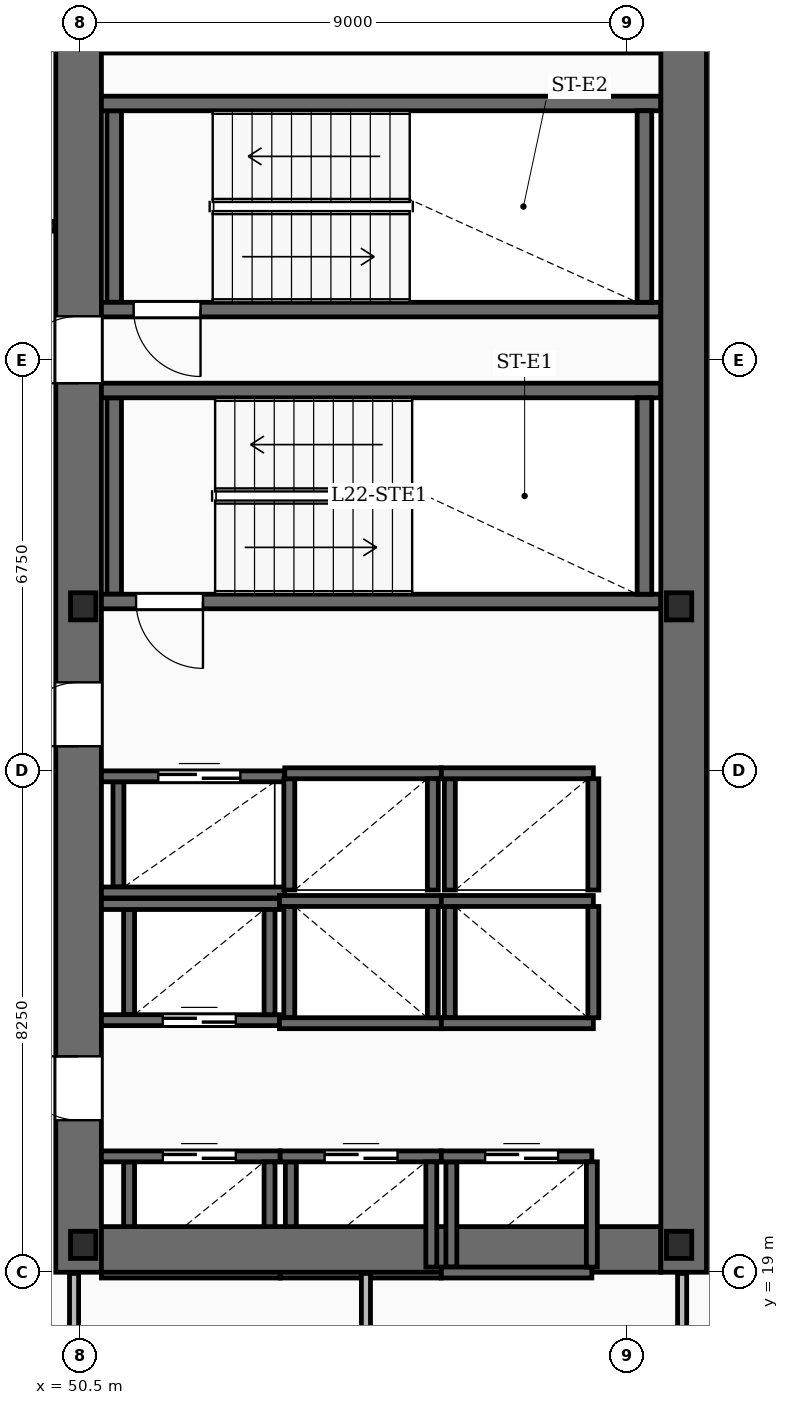
"""IFC4 building model, lengths in metres.
Left out: names, types, materials, properties, quantities, classifications, styles, units other than length and angle.
Written with IfcOpenShell. Run it as: python <this file> out.ifc"""

import sys

from ifc_helpers import new_model, si_unit, direction, frame, frame_2d, origin, origin_2d, place, context, subcontext, project, spatial, rectangle, i_section, extrude, element, fill, save


model = new_model("IFC4")
c1 = context("Model", 3, precision=1e-05, world=origin(), true_north=direction((0.0, 1.0)))
c2 = subcontext(c1, "Body", "Model", "MODEL_VIEW")
j1 = project(units=[si_unit("LENGTHUNIT", "METRE"), si_unit("PLANEANGLEUNIT", "RADIAN")], contexts=[c1])
p1 = place(None, origin())
s1 = spatial("IfcSite", under=j1, at=p1, CompositionType="ELEMENT")
p2 = place(p1, origin())
s2 = spatial("IfcBuilding", under=s1, at=p2, CompositionType="ELEMENT")
p3 = place(p2, frame((0.0, 0.0, 99.7)))
s3 = spatial("IfcBuildingStorey", under=s2, at=p3, CompositionType="ELEMENT", Elevation=99.7)
p4 = place(p3, frame((50.475, 19.0, -0.45), z_axis=(0.0, 0.0, 1.0), x_axis=(0.0, 1.0, 0.0)))
e1 = element("IfcWall", 1, at=p4, inside=s3, PredefinedType="SHEAR", context=c2, shape_type="SweptSolid", body=[
    extrude(rectangle(XDim=20.8, YDim=0.75, at=frame_2d((10.4, 0.0))), origin(), (0.0, 0.0, 1.0), 3.93),
])
p5 = place(p4, frame((2.5, 0.0, 0.45)))
e2 = element("IfcOpeningElement", 2, at=p5, cuts=e1, PredefinedType="OPENING", context=c2, shape_type="SweptSolid", body=[
    extrude(rectangle(XDim=1.05, YDim=2.15, at=frame_2d((0.525, 1.075))), frame((0.0, 0.385, 0.0), z_axis=(0.0, -1.0, 0.0), x_axis=(1.0, 0.0, 0.0)), (0.0, 0.0, 1.0), 0.77),
])
p6 = place(p4, frame((8.65, 0.0, 0.45)))
e3 = element("IfcOpeningElement", 3, at=p6, cuts=e1, PredefinedType="OPENING", context=c2, shape_type="SweptSolid", body=[
    extrude(rectangle(XDim=1.05, YDim=2.15, at=frame_2d((0.525, 1.075))), frame((0.0, 0.385, 0.0), z_axis=(0.0, -1.0, 0.0), x_axis=(1.0, 0.0, 0.0)), (0.0, 0.0, 1.0), 0.77),
])
p7 = place(p4, frame((14.62, 0.0, 0.45)))
e4 = element("IfcOpeningElement", 4, at=p7, cuts=e1, PredefinedType="OPENING", context=c2, shape_type="SweptSolid", body=[
    extrude(rectangle(XDim=1.1, YDim=2.15, at=frame_2d((0.55, 1.075))), frame((0.0, 0.385, 0.0), z_axis=(0.0, -1.0, 0.0), x_axis=(1.0, 0.0, 0.0)), (0.0, 0.0, 1.0), 0.77),
])
p8 = place(p3, frame((60.425, 19.0, -0.45), z_axis=(0.0, 0.0, 1.0), x_axis=(0.0, 1.0, 0.0)))
e5 = element("IfcWall", 5, at=p8, inside=s3, PredefinedType="SHEAR", context=c2, shape_type="SweptSolid", body=[
    extrude(rectangle(XDim=20.8, YDim=0.75, at=frame_2d((10.4, 0.0))), origin(), (0.0, 0.0, 1.0), 3.93),
])
for number, where, z_axis, x_axis in (
    (6, (50.85, 19.375, -0.45), (0.0, 0.0, 1.0), (1.0, 0.0, 0.0)),
    (7, (50.85, 39.425, -0.45), (0.0, 0.0, 1.0), (1.0, 0.0, 0.0)),
):
    element("IfcWall", number, at=place(p3, frame(where, z_axis=z_axis, x_axis=x_axis)), inside=s3, PredefinedType="SHEAR", context=c2, shape_type="SweptSolid", body=[
        extrude(rectangle(XDim=9.2, YDim=0.75, at=frame_2d((4.6, 0.0))), origin(), (0.0, 0.0, 1.0), 3.93),
    ])
for number, where, z_axis, x_axis in (
    (8, (50.55, 19.45, -0.45), (0.0, 0.0, 1.0), (1.0, 0.0, 0.0)),
    (9, (60.35, 19.45, -0.45), (0.0, 0.0, 1.0), (1.0, 0.0, 0.0)),
    (10, (50.55, 29.95, -0.45), (0.0, 0.0, 1.0), (1.0, 0.0, 0.0)),
    (11, (60.35, 29.95, -0.45), (0.0, 0.0, 1.0), (1.0, 0.0, 0.0)),
):
    element("IfcColumn", number, at=place(p3, frame(where, z_axis=z_axis, x_axis=x_axis)), inside=s3, PredefinedType="COLUMN", context=c2, shape_type="SweptSolid", body=[
        extrude(i_section(OverallWidth=0.416, OverallDepth=0.446, WebThickness=0.039, FlangeThickness=0.063, FilletRadius=0.02, at=origin_2d()), origin(), (0.0, 0.0, 1.0), 3.93),
    ])
p9 = place(p3, frame((60.05, 30.03, 0.0), z_axis=(0.0, 0.0, 1.0), x_axis=(-1.0, 0.0, 0.0)))
e12 = element("IfcWall", 12, at=p9, inside=s3, PredefinedType="SOLIDWALL", context=c2, shape_type="SweptSolid", body=[
    extrude(rectangle(XDim=9.2, YDim=0.24, at=frame_2d((4.6, 0.0))), origin(), (0.0, 0.0, 1.0), 3.48),
])
p10 = place(p9, frame((7.53, 0.0, 0.0)))
e13 = element("IfcOpeningElement", 13, at=p10, cuts=e12, PredefinedType="OPENING", context=c2, shape_type="SweptSolid", body=[
    extrude(rectangle(XDim=1.1, YDim=2.15, at=frame_2d((0.55, 1.075))), frame((0.0, 0.13, 0.0), z_axis=(0.0, -1.0, 0.0), x_axis=(1.0, 0.0, 0.0)), (0.0, 0.0, 1.0), 0.26),
])
p11 = place(p3, frame((50.85, 33.5, 0.0), z_axis=(0.0, 0.0, 1.0), x_axis=(1.0, 0.0, 0.0)))
e14 = element("IfcWall", 14, at=p11, inside=s3, PredefinedType="SOLIDWALL", context=c2, shape_type="SweptSolid", body=[
    extrude(rectangle(XDim=9.2, YDim=0.24, at=frame_2d((4.6, 0.0))), origin(), (0.0, 0.0, 1.0), 3.48),
])
for number, where, z_axis, x_axis in (
    (15, (51.06, 30.15, 0.0), (0.0, 0.0, 1.0), (0.0, 1.0, 0.0)),
    (16, (59.78, 30.15, 0.0), (0.0, 0.0, 1.0), (0.0, 1.0, 0.0)),
):
    element("IfcWall", number, at=place(p3, frame(where, z_axis=z_axis, x_axis=x_axis)), inside=s3, PredefinedType="SOLIDWALL", context=c2, shape_type="SweptSolid", body=[
        extrude(rectangle(XDim=3.23, YDim=0.24, at=frame_2d((1.615, 0.0))), origin(), (0.0, 0.0, 1.0), 3.48),
    ])
p12 = place(p3, frame((60.05, 34.83, 0.0), z_axis=(0.0, 0.0, 1.0), x_axis=(-1.0, 0.0, 0.0)))
e17 = element("IfcWall", 17, at=p12, inside=s3, PredefinedType="SOLIDWALL", context=c2, shape_type="SweptSolid", body=[
    extrude(rectangle(XDim=9.2, YDim=0.24, at=frame_2d((4.6, 0.0))), origin(), (0.0, 0.0, 1.0), 3.48),
])
p13 = place(p12, frame((7.57, 0.0, 0.0)))
e18 = element("IfcOpeningElement", 18, at=p13, cuts=e17, PredefinedType="OPENING", context=c2, shape_type="SweptSolid", body=[
    extrude(rectangle(XDim=1.1, YDim=2.15, at=frame_2d((0.55, 1.075))), frame((0.0, 0.13, 0.0), z_axis=(0.0, -1.0, 0.0), x_axis=(1.0, 0.0, 0.0)), (0.0, 0.0, 1.0), 0.26),
])
p14 = place(p3, frame((50.85, 38.22, 0.0), z_axis=(0.0, 0.0, 1.0), x_axis=(1.0, 0.0, 0.0)))
e19 = element("IfcWall", 19, at=p14, inside=s3, PredefinedType="SOLIDWALL", context=c2, shape_type="SweptSolid", body=[
    extrude(rectangle(XDim=9.2, YDim=0.24, at=frame_2d((4.6, 0.0))), origin(), (0.0, 0.0, 1.0), 3.48),
])
for number, where, z_axis, x_axis in (
    (20, (51.06, 34.95, 0.0), (0.0, 0.0, 1.0), (0.0, 1.0, 0.0)),
    (21, (59.78, 34.95, 0.0), (0.0, 0.0, 1.0), (0.0, 1.0, 0.0)),
):
    element("IfcWall", number, at=place(p3, frame(where, z_axis=z_axis, x_axis=x_axis)), inside=s3, PredefinedType="SOLIDWALL", context=c2, shape_type="SweptSolid", body=[
        extrude(rectangle(XDim=3.15, YDim=0.24, at=frame_2d((1.575, 0.0))), origin(), (0.0, 0.0, 1.0), 3.48),
    ])
p15 = place(p3, frame((50.85, 20.905, 0.0), z_axis=(0.0, 0.0, 1.0), x_axis=(1.0, 0.0, 0.0)))
e22 = element("IfcWall", 22, at=p15, inside=s3, PredefinedType="SOLIDWALL", context=c2, shape_type="SweptSolid", body=[
    extrude(rectangle(XDim=2.94, YDim=0.18, at=frame_2d((1.47, 0.0))), origin(), (0.0, 0.0, 1.0), 3.48),
])
p16 = place(p15, frame((1.01, 0.0, 0.0)))
e23 = element("IfcOpeningElement", 23, at=p16, cuts=e22, PredefinedType="OPENING", context=c2, shape_type="SweptSolid", body=[
    extrude(rectangle(XDim=1.2, YDim=2.2, at=frame_2d((0.6, 1.1))), frame((0.0, 0.1, 0.0), z_axis=(0.0, -1.0, 0.0), x_axis=(1.0, 0.0, 0.0)), (0.0, 0.0, 1.0), 0.2),
])
p17 = place(p3, frame((50.85, 18.995, 0.0), z_axis=(0.0, 0.0, 1.0), x_axis=(1.0, 0.0, 0.0)))
e24 = element("IfcWall", 24, at=p17, inside=s3, PredefinedType="SOLIDWALL", context=c2, shape_type="SweptSolid", body=[
    extrude(rectangle(XDim=2.94, YDim=0.18, at=frame_2d((1.47, 0.0))), origin(), (0.0, 0.0, 1.0), 3.48),
])
for number, where, z_axis, x_axis in (
    (25, (51.305, 19.085, 0.0), (0.0, 0.0, 1.0), (0.0, 1.0, 0.0)),
    (26, (53.615, 19.085, 0.0), (0.0, 0.0, 1.0), (0.0, 1.0, 0.0)),
):
    element("IfcWall", number, at=place(p3, frame(where, z_axis=z_axis, x_axis=x_axis)), inside=s3, PredefinedType="SOLIDWALL", context=c2, shape_type="SweptSolid", body=[
        extrude(rectangle(XDim=1.73, YDim=0.18, at=frame_2d((0.865, 0.0))), origin(), (0.0, 0.0, 1.0), 3.48),
    ])
p18 = place(p3, frame((53.79, 20.905, 0.0), z_axis=(0.0, 0.0, 1.0), x_axis=(1.0, 0.0, 0.0)))
e27 = element("IfcWall", 27, at=p18, inside=s3, PredefinedType="SOLIDWALL", context=c2, shape_type="SweptSolid", body=[
    extrude(rectangle(XDim=2.65, YDim=0.18, at=frame_2d((1.325, 0.0))), origin(), (0.0, 0.0, 1.0), 3.48),
])
p19 = place(p18, frame((0.73, 0.0, 0.0)))
e28 = element("IfcOpeningElement", 28, at=p19, cuts=e27, PredefinedType="OPENING", context=c2, shape_type="SweptSolid", body=[
    extrude(rectangle(XDim=1.2, YDim=2.2, at=frame_2d((0.6, 1.1))), frame((0.0, 0.1, 0.0), z_axis=(0.0, -1.0, 0.0), x_axis=(1.0, 0.0, 0.0)), (0.0, 0.0, 1.0), 0.2),
])
p20 = place(p3, frame((53.79, 18.995, 0.0), z_axis=(0.0, 0.0, 1.0), x_axis=(1.0, 0.0, 0.0)))
e29 = element("IfcWall", 29, at=p20, inside=s3, PredefinedType="SOLIDWALL", context=c2, shape_type="SweptSolid", body=[
    extrude(rectangle(XDim=2.65, YDim=0.18, at=frame_2d((1.325, 0.0))), origin(), (0.0, 0.0, 1.0), 3.48),
])
for number, where, z_axis, x_axis in (
    (30, (53.965, 19.085, 0.0), (0.0, 0.0, 1.0), (0.0, 1.0, 0.0)),
    (31, (56.275, 19.085, 0.0), (0.0, 0.0, 1.0), (0.0, 1.0, 0.0)),
):
    element("IfcWall", number, at=place(p3, frame(where, z_axis=z_axis, x_axis=x_axis)), inside=s3, PredefinedType="SOLIDWALL", context=c2, shape_type="SweptSolid", body=[
        extrude(rectangle(XDim=1.73, YDim=0.18, at=frame_2d((0.865, 0.0))), origin(), (0.0, 0.0, 1.0), 3.48),
    ])
p21 = place(p3, frame((56.44, 20.905, 0.0), z_axis=(0.0, 0.0, 1.0), x_axis=(1.0, 0.0, 0.0)))
e32 = element("IfcWall", 32, at=p21, inside=s3, PredefinedType="SOLIDWALL", context=c2, shape_type="SweptSolid", body=[
    extrude(rectangle(XDim=2.475, YDim=0.18, at=frame_2d((1.238, 0.0))), origin(), (0.0, 0.0, 1.0), 3.48),
])
p22 = place(p21, frame((0.72, 0.0, 0.0)))
e33 = element("IfcOpeningElement", 33, at=p22, cuts=e32, PredefinedType="OPENING", context=c2, shape_type="SweptSolid", body=[
    extrude(rectangle(XDim=1.2, YDim=2.2, at=frame_2d((0.6, 1.1))), frame((0.0, 0.1, 0.0), z_axis=(0.0, -1.0, 0.0), x_axis=(1.0, 0.0, 0.0)), (0.0, 0.0, 1.0), 0.2),
])
p23 = place(p3, frame((56.44, 18.995, 0.0), z_axis=(0.0, 0.0, 1.0), x_axis=(1.0, 0.0, 0.0)))
e34 = element("IfcWall", 34, at=p23, inside=s3, PredefinedType="SOLIDWALL", context=c2, shape_type="SweptSolid", body=[
    extrude(rectangle(XDim=2.475, YDim=0.18, at=frame_2d((1.238, 0.0))), origin(), (0.0, 0.0, 1.0), 3.48),
])
for number, where, z_axis, x_axis in (
    (35, (56.605, 19.085, 0.0), (0.0, 0.0, 1.0), (0.0, 1.0, 0.0)),
    (36, (58.915, 19.085, 0.0), (0.0, 0.0, 1.0), (0.0, 1.0, 0.0)),
):
    element("IfcWall", number, at=place(p3, frame(where, z_axis=z_axis, x_axis=x_axis)), inside=s3, PredefinedType="SOLIDWALL", context=c2, shape_type="SweptSolid", body=[
        extrude(rectangle(XDim=1.73, YDim=0.18, at=frame_2d((0.865, 0.0))), origin(), (0.0, 0.0, 1.0), 3.48),
    ])
p24 = place(p3, frame((50.85, 25.055, 0.0), z_axis=(0.0, 0.0, 1.0), x_axis=(1.0, 0.0, 0.0)))
e37 = element("IfcWall", 37, at=p24, inside=s3, PredefinedType="SOLIDWALL", context=c2, shape_type="SweptSolid", body=[
    extrude(rectangle(XDim=2.927, YDim=0.18, at=frame_2d((1.464, 0.0))), origin(), (0.0, 0.0, 1.0), 3.48),
])
p25 = place(p3, frame((50.85, 23.145, 0.0), z_axis=(0.0, 0.0, 1.0), x_axis=(1.0, 0.0, 0.0)))
e38 = element("IfcWall", 38, at=p25, inside=s3, PredefinedType="SOLIDWALL", context=c2, shape_type="SweptSolid", body=[
    extrude(rectangle(XDim=2.927, YDim=0.18, at=frame_2d((1.464, 0.0))), origin(), (0.0, 0.0, 1.0), 3.48),
])
p26 = place(p25, frame((1.01, 0.0, 0.0)))
e39 = element("IfcOpeningElement", 39, at=p26, cuts=e38, PredefinedType="OPENING", context=c2, shape_type="SweptSolid", body=[
    extrude(rectangle(XDim=1.2, YDim=2.2, at=frame_2d((0.6, 1.1))), frame((0.0, 0.1, 0.0), z_axis=(0.0, -1.0, 0.0), x_axis=(1.0, 0.0, 0.0)), (0.0, 0.0, 1.0), 0.2),
])
for number, where, z_axis, x_axis in (
    (40, (51.305, 23.235, 0.0), (0.0, 0.0, 1.0), (0.0, 1.0, 0.0)),
    (41, (53.615, 23.235, 0.0), (0.0, 0.0, 1.0), (0.0, 1.0, 0.0)),
):
    element("IfcWall", number, at=place(p3, frame(where, z_axis=z_axis, x_axis=x_axis)), inside=s3, PredefinedType="SOLIDWALL", context=c2, shape_type="SweptSolid", body=[
        extrude(rectangle(XDim=1.73, YDim=0.18, at=frame_2d((0.865, 0.0))), origin(), (0.0, 0.0, 1.0), 3.48),
    ])
for number, where, z_axis, x_axis in (
    (42, (53.778, 25.105, 0.0), (0.0, 0.0, 1.0), (1.0, 0.0, 0.0)),
    (43, (53.778, 23.095, 0.0), (0.0, 0.0, 1.0), (1.0, 0.0, 0.0)),
):
    element("IfcWall", number, at=place(p3, frame(where, z_axis=z_axis, x_axis=x_axis)), inside=s3, PredefinedType="SOLIDWALL", context=c2, shape_type="SweptSolid", body=[
        extrude(rectangle(XDim=2.662, YDim=0.18, at=frame_2d((1.331, 0.0))), origin(), (0.0, 0.0, 1.0), 3.48),
    ])
for number, where, z_axis, x_axis in (
    (44, (53.94, 23.185, 0.0), (0.0, 0.0, 1.0), (0.0, 1.0, 0.0)),
    (45, (56.3, 23.185, 0.0), (0.0, 0.0, 1.0), (0.0, 1.0, 0.0)),
):
    element("IfcWall", number, at=place(p3, frame(where, z_axis=z_axis, x_axis=x_axis)), inside=s3, PredefinedType="SOLIDWALL", context=c2, shape_type="SweptSolid", body=[
        extrude(rectangle(XDim=1.83, YDim=0.18, at=frame_2d((0.915, 0.0))), origin(), (0.0, 0.0, 1.0), 3.48),
    ])
for number, where, z_axis, x_axis in (
    (46, (56.44, 25.105, 0.0), (0.0, 0.0, 1.0), (1.0, 0.0, 0.0)),
    (47, (56.44, 23.095, 0.0), (0.0, 0.0, 1.0), (1.0, 0.0, 0.0)),
):
    element("IfcWall", number, at=place(p3, frame(where, z_axis=z_axis, x_axis=x_axis)), inside=s3, PredefinedType="SOLIDWALL", context=c2, shape_type="SweptSolid", body=[
        extrude(rectangle(XDim=2.5, YDim=0.18, at=frame_2d((1.25, 0.0))), origin(), (0.0, 0.0, 1.0), 3.48),
    ])
for number, where, z_axis, x_axis in (
    (48, (56.58, 23.185, 0.0), (0.0, 0.0, 1.0), (0.0, 1.0, 0.0)),
    (49, (58.94, 23.185, 0.0), (0.0, 0.0, 1.0), (0.0, 1.0, 0.0)),
):
    element("IfcWall", number, at=place(p3, frame(where, z_axis=z_axis, x_axis=x_axis)), inside=s3, PredefinedType="SOLIDWALL", context=c2, shape_type="SweptSolid", body=[
        extrude(rectangle(XDim=1.83, YDim=0.18, at=frame_2d((0.915, 0.0))), origin(), (0.0, 0.0, 1.0), 3.48),
    ])
p27 = place(p3, frame((53.865, 27.205, 0.0), z_axis=(0.0, 0.0, 1.0), x_axis=(1.0, 0.0, 0.0)))
e50 = element("IfcWall", 50, at=p27, inside=s3, PredefinedType="SOLIDWALL", context=c2, shape_type="SweptSolid", body=[
    extrude(rectangle(XDim=2.575, YDim=0.18, at=frame_2d((1.288, 0.0))), origin(), (0.0, 0.0, 1.0), 3.48),
])
for number, where, z_axis, x_axis in (
    (51, (53.94, 25.285, 0.0), (0.0, 0.0, 1.0), (0.0, 1.0, 0.0)),
    (52, (56.3, 25.285, 0.0), (0.0, 0.0, 1.0), (0.0, 1.0, 0.0)),
):
    element("IfcWall", number, at=place(p3, frame(where, z_axis=z_axis, x_axis=x_axis)), inside=s3, PredefinedType="SOLIDWALL", context=c2, shape_type="SweptSolid", body=[
        extrude(rectangle(XDim=1.83, YDim=0.18, at=frame_2d((0.915, 0.0))), origin(), (0.0, 0.0, 1.0), 3.48),
    ])
p28 = place(p3, frame((56.44, 27.205, 0.0), z_axis=(0.0, 0.0, 1.0), x_axis=(1.0, 0.0, 0.0)))
e53 = element("IfcWall", 53, at=p28, inside=s3, PredefinedType="SOLIDWALL", context=c2, shape_type="SweptSolid", body=[
    extrude(rectangle(XDim=2.5, YDim=0.18, at=frame_2d((1.25, 0.0))), origin(), (0.0, 0.0, 1.0), 3.48),
])
for number, where, z_axis, x_axis in (
    (54, (56.58, 25.285, 0.0), (0.0, 0.0, 1.0), (0.0, 1.0, 0.0)),
    (55, (58.94, 25.285, 0.0), (0.0, 0.0, 1.0), (0.0, 1.0, 0.0)),
):
    element("IfcWall", number, at=place(p3, frame(where, z_axis=z_axis, x_axis=x_axis)), inside=s3, PredefinedType="SOLIDWALL", context=c2, shape_type="SweptSolid", body=[
        extrude(rectangle(XDim=1.83, YDim=0.18, at=frame_2d((0.915, 0.0))), origin(), (0.0, 0.0, 1.0), 3.48),
    ])
p29 = place(p3, frame((50.85, 27.155, 0.0), z_axis=(0.0, 0.0, 1.0), x_axis=(1.0, 0.0, 0.0)))
e56 = element("IfcWall", 56, at=p29, inside=s3, PredefinedType="SOLIDWALL", context=c2, shape_type="SweptSolid", body=[
    extrude(rectangle(XDim=3.015, YDim=0.18, at=frame_2d((1.507, 0.0))), origin(), (0.0, 0.0, 1.0), 3.48),
])
p30 = place(p29, frame((0.935, 0.0, 0.0)))
e57 = element("IfcOpeningElement", 57, at=p30, cuts=e56, PredefinedType="OPENING", context=c2, shape_type="SweptSolid", body=[
    extrude(rectangle(XDim=1.35, YDim=2.3, at=frame_2d((0.675, 1.15))), frame((0.0, 0.1, 0.0), z_axis=(0.0, -1.0, 0.0), x_axis=(1.0, 0.0, 0.0)), (0.0, 0.0, 1.0), 0.2),
])
p31 = place(p3, frame((50.85, 25.245, 0.0), z_axis=(0.0, 0.0, 1.0), x_axis=(1.0, 0.0, 0.0)))
e58 = element("IfcWall", 58, at=p31, inside=s3, PredefinedType="SOLIDWALL", context=c2, shape_type="SweptSolid", body=[
    extrude(rectangle(XDim=3.015, YDim=0.18, at=frame_2d((1.507, 0.0))), origin(), (0.0, 0.0, 1.0), 3.48),
])
p32 = place(p3, frame((51.13, 25.335, 0.0), z_axis=(0.0, 0.0, 1.0), x_axis=(0.0, 1.0, 0.0)))
e59 = element("IfcWall", 59, at=p32, inside=s3, PredefinedType="SOLIDWALL", context=c2, shape_type="SweptSolid", body=[
    extrude(rectangle(XDim=1.73, YDim=0.18, at=frame_2d((0.865, 0.0))), origin(), (0.0, 0.0, 1.0), 3.48),
])
for number, where, z_axis, x_axis in (
    (60, (55.2, 15.4, 0.0), (0.0, 0.0, 1.0), (0.0, 1.0, 0.0)),
    (61, (50.4, 15.4, 0.0), (0.0, 0.0, 1.0), (0.0, 1.0, 0.0)),
    (62, (60.4, 15.4, 0.0), (0.0, 0.0, 1.0), (0.0, 1.0, 0.0)),
):
    element("IfcWall", number, at=place(p3, frame(where, z_axis=z_axis, x_axis=x_axis)), inside=s3, PredefinedType="PARTITIONING", context=c2, shape_type="SweptSolid", body=[
        extrude(rectangle(XDim=3.58, YDim=0.15, at=frame_2d((1.79, 0.0))), origin(), (0.0, 0.0, 1.0), 2.54),
    ])
p33 = place(p3, frame((47.82, 36.2, 0.0), z_axis=(0.0, 0.0, 1.0), x_axis=(1.0, 0.0, 0.0)))
e63 = element("IfcWall", 63, at=p33, inside=s3, PredefinedType="PARTITIONING", context=c2, shape_type="SweptSolid", body=[
    extrude(rectangle(XDim=2.26, YDim=0.16, at=frame_2d((1.13, 0.0))), origin(), (0.0, 0.0, 1.0), 2.54),
])
p34 = place(p5, origin())
e64 = element("IfcDoor", 64, at=p34, inside=s3, OperationType="SINGLE_SWING_RIGHT", PredefinedType="DOOR", context=c2, shape_type="SweptSolid", body=[
    extrude(rectangle(XDim=1.05, YDim=2.15, at=frame_2d((0.525, 1.075))), frame((0.0, 0.025, 0.0), z_axis=(0.0, -1.0, 0.0), x_axis=(1.0, 0.0, 0.0)), (0.0, 0.0, 1.0), 0.05),
])
fill(e2, e64)
p35 = place(p6, origin())
e65 = element("IfcDoor", 65, at=p35, inside=s3, OperationType="SINGLE_SWING_LEFT", PredefinedType="DOOR", context=c2, shape_type="SweptSolid", body=[
    extrude(rectangle(XDim=1.05, YDim=2.15, at=frame_2d((0.525, 1.075))), frame((0.0, 0.025, 0.0), z_axis=(0.0, -1.0, 0.0), x_axis=(1.0, 0.0, 0.0)), (0.0, 0.0, 1.0), 0.05),
])
fill(e3, e65)
p36 = place(p7, origin())
e66 = element("IfcDoor", 66, at=p36, inside=s3, OperationType="SINGLE_SWING_LEFT", PredefinedType="DOOR", context=c2, shape_type="SweptSolid", body=[
    extrude(rectangle(XDim=1.1, YDim=2.15, at=frame_2d((0.55, 1.075))), frame((0.0, 0.025, 0.0), z_axis=(0.0, -1.0, 0.0), x_axis=(1.0, 0.0, 0.0)), (0.0, 0.0, 1.0), 0.05),
])
fill(e4, e66)
p37 = place(p10, origin())
e67 = element("IfcDoor", 67, at=p37, inside=s3, OperationType="SINGLE_SWING_LEFT", PredefinedType="DOOR", context=c2, shape_type="SweptSolid", body=[
    extrude(rectangle(XDim=1.1, YDim=2.15, at=frame_2d((0.55, 1.075))), frame((0.0, 0.025, 0.0), z_axis=(0.0, -1.0, 0.0), x_axis=(1.0, 0.0, 0.0)), (0.0, 0.0, 1.0), 0.05),
])
fill(e13, e67)
p38 = place(p13, origin())
e68 = element("IfcDoor", 68, at=p38, inside=s3, OperationType="SINGLE_SWING_LEFT", PredefinedType="DOOR", context=c2, shape_type="SweptSolid", body=[
    extrude(rectangle(XDim=1.1, YDim=2.15, at=frame_2d((0.55, 1.075))), frame((0.0, 0.025, 0.0), z_axis=(0.0, -1.0, 0.0), x_axis=(1.0, 0.0, 0.0)), (0.0, 0.0, 1.0), 0.05),
])
fill(e18, e68)
p39 = place(p16, origin())
e69 = element("IfcDoor", 69, at=p39, inside=s3, OperationType="DOUBLE_DOOR_SLIDING", PredefinedType="DOOR", context=c2, shape_type="SweptSolid", body=[
    extrude(rectangle(XDim=1.2, YDim=2.2, at=frame_2d((0.6, 1.1))), frame((0.0, 0.025, 0.0), z_axis=(0.0, -1.0, 0.0), x_axis=(1.0, 0.0, 0.0)), (0.0, 0.0, 1.0), 0.05),
])
fill(e23, e69)
p40 = place(p19, origin())
e70 = element("IfcDoor", 70, at=p40, inside=s3, OperationType="DOUBLE_DOOR_SLIDING", PredefinedType="DOOR", context=c2, shape_type="SweptSolid", body=[
    extrude(rectangle(XDim=1.2, YDim=2.2, at=frame_2d((0.6, 1.1))), frame((0.0, 0.025, 0.0), z_axis=(0.0, -1.0, 0.0), x_axis=(1.0, 0.0, 0.0)), (0.0, 0.0, 1.0), 0.05),
])
fill(e28, e70)
p41 = place(p22, origin())
e71 = element("IfcDoor", 71, at=p41, inside=s3, OperationType="DOUBLE_DOOR_SLIDING", PredefinedType="DOOR", context=c2, shape_type="SweptSolid", body=[
    extrude(rectangle(XDim=1.2, YDim=2.2, at=frame_2d((0.6, 1.1))), frame((0.0, 0.025, 0.0), z_axis=(0.0, -1.0, 0.0), x_axis=(1.0, 0.0, 0.0)), (0.0, 0.0, 1.0), 0.05),
])
fill(e33, e71)
p42 = place(p26, origin())
e72 = element("IfcDoor", 72, at=p42, inside=s3, OperationType="DOUBLE_DOOR_SLIDING", PredefinedType="DOOR", context=c2, shape_type="SweptSolid", body=[
    extrude(rectangle(XDim=1.2, YDim=2.2, at=frame_2d((0.6, 1.1))), frame((0.0, 0.025, 0.0), z_axis=(0.0, -1.0, 0.0), x_axis=(1.0, 0.0, 0.0)), (0.0, 0.0, 1.0), 0.05),
])
fill(e39, e72)
p43 = place(p30, origin())
e73 = element("IfcDoor", 73, at=p43, inside=s3, OperationType="DOUBLE_DOOR_SLIDING", PredefinedType="DOOR", context=c2, shape_type="SweptSolid", body=[
    extrude(rectangle(XDim=1.35, YDim=2.3, at=frame_2d((0.675, 1.15))), frame((0.0, 0.025, 0.0), z_axis=(0.0, -1.0, 0.0), x_axis=(1.0, 0.0, 0.0)), (0.0, 0.0, 1.0), 0.05),
])
fill(e57, e73)
save(model, sys.argv[1])
